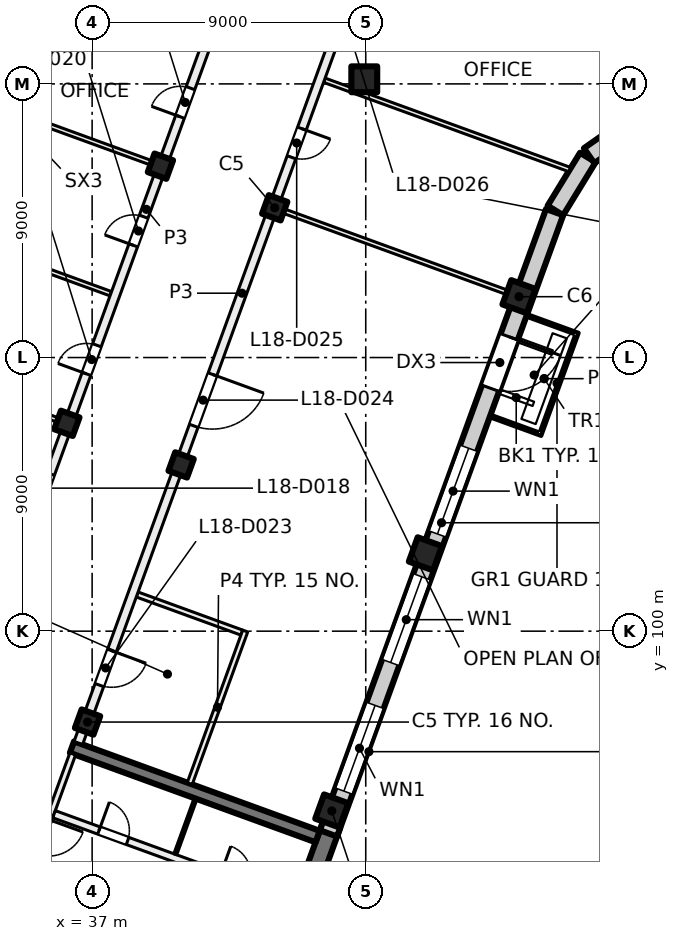
"""IFC4 building model, lengths in metres.
Left out: names, types, materials, properties, quantities, classifications, styles, units other than length and angle.
Written with IfcOpenShell. Run it as: python <this file> out.ifc"""

import sys

from ifc_helpers import new_model, si_unit, direction, frame, frame_2d, origin, origin_2d, place, context, subcontext, project, spatial, rectangle, extrude, element, fill, save


model = new_model("IFC4")
c1 = context("Model", 3, precision=1e-05, world=origin(), true_north=direction((0.0, 1.0)))
c2 = subcontext(c1, "Body", "Model", "MODEL_VIEW")
j1 = project(units=[si_unit("LENGTHUNIT", "METRE"), si_unit("PLANEANGLEUNIT", "RADIAN")], contexts=[c1])
p1 = place(None, origin())
s1 = spatial("IfcSite", under=j1, at=p1, CompositionType="ELEMENT")
p2 = place(p1, origin())
s2 = spatial("IfcBuilding", under=s1, at=p2, CompositionType="ELEMENT")
p3 = place(p2, frame((0.0, 0.0, 81.0)))
s3 = spatial("IfcBuildingStorey", under=s2, at=p3, CompositionType="ELEMENT", Elevation=81.0)
p4 = place(p3, frame((45.952, 118.152, 0.0), z_axis=(0.0, 0.0, 1.0), x_axis=(1.0, 0.0, 0.0)))
e1 = element("IfcColumn", 1, at=p4, inside=s3, PredefinedType="COLUMN", context=c2, shape_type="SweptSolid", body=[
    extrude(rectangle(XDim=0.85, YDim=0.85, at=origin_2d()), origin(), (0.0, 0.0, 1.0), 4.0),
])
for number, where, z_axis, x_axis in (
    (2, (43.006, 113.925, 0.0), (0.0, 0.0, 1.0), (-0.342, -0.94, 0.0)),
    (3, (39.927, 105.468, 0.0), (0.0, 0.0, 1.0), (-0.342, -0.94, 0.0)),
    (4, (36.849, 97.011, 0.0), (0.0, 0.0, 1.0), (-0.342, -0.94, 0.0)),
    (5, (39.247, 115.293, 0.0), (0.0, 0.0, 1.0), (-0.342, -0.94, 0.0)),
    (6, (36.169, 106.836, 0.0), (0.0, 0.0, 1.0), (-0.342, -0.94, 0.0)),
):
    element("IfcColumn", number, at=place(p3, frame(where, z_axis=z_axis, x_axis=x_axis)), inside=s3, PredefinedType="COLUMN", context=c2, shape_type="SweptSolid", body=[
        extrude(rectangle(XDim=0.65, YDim=0.65, at=origin_2d()), origin(), (0.0, 0.0, 1.0), 4.0),
    ])
for number, where, z_axis, x_axis in (
    (7, (51.04, 111.001, 0.0), (0.0, 0.0, 1.0), (-0.342, -0.94, 0.0)),
    (8, (47.962, 102.544, 0.0), (0.0, 0.0, 1.0), (-0.342, -0.94, 0.0)),
    (9, (44.884, 94.087, 0.0), (0.0, 0.0, 1.0), (-0.342, -0.94, 0.0)),
):
    element("IfcColumn", number, at=place(p3, frame(where, z_axis=z_axis, x_axis=x_axis)), inside=s3, PredefinedType="COLUMN", context=c2, shape_type="SweptSolid", body=[
        extrude(rectangle(XDim=0.85, YDim=0.85, at=origin_2d()), origin(), (0.0, 0.0, 1.0), 4.0),
    ])
p5 = place(p3, frame((41.827, 85.249, 0.0), z_axis=(0.0, 0.0, 1.0), x_axis=(0.342017595281, 0.939693548195, 0.0)))
e10 = element("IfcWall", 10, at=p5, inside=s3, PredefinedType="SHEAR", context=c2, shape_type="SweptSolid", body=[
    extrude(rectangle(XDim=8.925, YDim=0.6, at=frame_2d((4.462, 0.0))), origin(), (0.0, 0.0, 1.0), 4.0),
])
p6 = place(p3, frame((44.418, 93.245, 0.0), z_axis=(0.0, 0.0, 1.0), x_axis=(-0.93969060187, 0.342025690201, 0.0)))
e11 = element("IfcWall", 11, at=p6, inside=s3, PredefinedType="SHEAR", context=c2, shape_type="SweptSolid", body=[
    extrude(rectangle(XDim=8.6, YDim=0.4, at=frame_2d((4.3, 0.0))), origin(), (0.0, 0.0, 1.0), 4.0),
])
p7 = place(p3, frame((52.212, 113.783, 0.0), z_axis=(0.0, 0.0, 1.0), x_axis=(-0.34202521188, -0.939690775968, 0.0)))
e12 = element("IfcWall", 12, at=p7, inside=s3, PredefinedType="SOLIDWALL", context=c2, shape_type="SweptSolid", body=[
    extrude(rectangle(XDim=21.745, YDim=0.6, at=frame_2d((10.873, 0.0))), origin(), (0.0, 0.0, 1.0), 3.625),
])
p8 = place(p7, frame((4.365, 0.0, 0.0)))
e13 = element("IfcOpeningElement", 13, at=p8, cuts=e12, PredefinedType="OPENING", context=c2, shape_type="SweptSolid", body=[
    extrude(rectangle(XDim=1.8, YDim=2.4, at=frame_2d((0.9, 1.2))), frame((0.0, 0.31, 0.0), z_axis=(0.0, -1.0, 0.0), x_axis=(1.0, 0.0, 0.0)), (0.0, 0.0, 1.0), 0.62),
])
p9 = place(p7, frame((8.265, 0.0, 0.9)))
e14 = element("IfcOpeningElement", 14, at=p9, cuts=e12, PredefinedType="OPENING", context=c2, shape_type="SweptSolid", body=[
    extrude(rectangle(XDim=3.0, YDim=2.4, at=frame_2d((1.5, 1.2))), frame((0.0, 0.31, 0.0), z_axis=(0.0, -1.0, 0.0), x_axis=(1.0, 0.0, 0.0)), (0.0, 0.0, 1.0), 0.62),
])
p10 = place(p7, frame((12.765, 0.0, 0.9)))
e15 = element("IfcOpeningElement", 15, at=p10, cuts=e12, PredefinedType="OPENING", context=c2, shape_type="SweptSolid", body=[
    extrude(rectangle(XDim=3.0, YDim=2.4, at=frame_2d((1.5, 1.2))), frame((0.0, 0.31, 0.0), z_axis=(0.0, -1.0, 0.0), x_axis=(1.0, 0.0, 0.0)), (0.0, 0.0, 1.0), 0.62),
])
p11 = place(p7, frame((17.265, 0.0, 0.9)))
e16 = element("IfcOpeningElement", 16, at=p11, cuts=e12, PredefinedType="OPENING", context=c2, shape_type="SweptSolid", body=[
    extrude(rectangle(XDim=3.0, YDim=2.4, at=frame_2d((1.5, 1.2))), frame((0.0, 0.31, 0.0), z_axis=(0.0, -1.0, 0.0), x_axis=(1.0, 0.0, 0.0)), (0.0, 0.0, 1.0), 0.62),
])
p12 = place(p3, frame((53.305, 115.578, 0.0), z_axis=(0.0, 0.0, 1.0), x_axis=(-0.522402266438, -0.852699168535, 0.0)))
e17 = element("IfcWall", 17, at=p12, inside=s3, PredefinedType="SOLIDWALL", context=c2, shape_type="SweptSolid", body=[
    extrude(rectangle(XDim=2.042, YDim=0.6, at=frame_2d((1.021, 0.0))), origin(), (0.0, 0.0, 1.0), 3.625),
])
p13 = place(p3, frame((55.062, 116.839, 0.0), z_axis=(0.0, 0.0, 1.0), x_axis=(-0.819122269495, -0.573618956815, 0.0)))
e18 = element("IfcWall", 18, at=p13, inside=s3, PredefinedType="SOLIDWALL", context=c2, shape_type="SweptSolid", body=[
    extrude(rectangle(XDim=2.092, YDim=0.6, at=frame_2d((1.046, 0.0))), origin(), (0.0, 0.0, 1.0), 3.625),
])
p14 = place(p3, frame((24.666, 100.669, 0.0), z_axis=(0.0, 0.0, 1.0), x_axis=(0.34201964167, 0.939692803373, 0.0)))
e19 = element("IfcWall", 19, at=p14, inside=s3, PredefinedType="SOLIDWALL", context=c2, shape_type="SweptSolid", body=[
    extrude(rectangle(XDim=32.884, YDim=0.6, at=frame_2d((16.442, 0.0))), origin(), (0.0, 0.0, 1.0), 3.625),
])
p15 = place(p14, frame((1.48, 0.0, 0.9)))
e20 = element("IfcOpeningElement", 20, at=p15, cuts=e19, PredefinedType="OPENING", context=c2, shape_type="SweptSolid", body=[
    extrude(rectangle(XDim=3.0, YDim=2.4, at=frame_2d((1.5, 1.2))), frame((0.0, 0.31, 0.0), z_axis=(0.0, -1.0, 0.0), x_axis=(1.0, 0.0, 0.0)), (0.0, 0.0, 1.0), 0.62),
])
p16 = place(p14, frame((5.98, 0.0, 0.9)))
e21 = element("IfcOpeningElement", 21, at=p16, cuts=e19, PredefinedType="OPENING", context=c2, shape_type="SweptSolid", body=[
    extrude(rectangle(XDim=3.0, YDim=2.4, at=frame_2d((1.5, 1.2))), frame((0.0, 0.31, 0.0), z_axis=(0.0, -1.0, 0.0), x_axis=(1.0, 0.0, 0.0)), (0.0, 0.0, 1.0), 0.62),
])
p17 = place(p14, frame((10.48, 0.0, 0.9)))
e22 = element("IfcOpeningElement", 22, at=p17, cuts=e19, PredefinedType="OPENING", context=c2, shape_type="SweptSolid", body=[
    extrude(rectangle(XDim=3.0, YDim=2.4, at=frame_2d((1.5, 1.2))), frame((0.0, 0.31, 0.0), z_axis=(0.0, -1.0, 0.0), x_axis=(1.0, 0.0, 0.0)), (0.0, 0.0, 1.0), 0.62),
])
p18 = place(p14, frame((14.98, 0.0, 0.9)))
e23 = element("IfcOpeningElement", 23, at=p18, cuts=e19, PredefinedType="OPENING", context=c2, shape_type="SweptSolid", body=[
    extrude(rectangle(XDim=3.0, YDim=2.4, at=frame_2d((1.5, 1.2))), frame((0.0, 0.31, 0.0), z_axis=(0.0, -1.0, 0.0), x_axis=(1.0, 0.0, 0.0)), (0.0, 0.0, 1.0), 0.62),
])
p19 = place(p14, frame((20.08, 0.0, 0.0)))
e24 = element("IfcOpeningElement", 24, at=p19, cuts=e19, PredefinedType="OPENING", context=c2, shape_type="SweptSolid", body=[
    extrude(rectangle(XDim=1.8, YDim=2.4, at=frame_2d((0.9, 1.2))), frame((0.0, 0.31, 0.0), z_axis=(0.0, -1.0, 0.0), x_axis=(1.0, 0.0, 0.0)), (0.0, 0.0, 1.0), 0.62),
])
p20 = place(p14, frame((23.98, 0.0, 0.9)))
e25 = element("IfcOpeningElement", 25, at=p20, cuts=e19, PredefinedType="OPENING", context=c2, shape_type="SweptSolid", body=[
    extrude(rectangle(XDim=3.0, YDim=2.4, at=frame_2d((1.5, 1.2))), frame((0.0, 0.31, 0.0), z_axis=(0.0, -1.0, 0.0), x_axis=(1.0, 0.0, 0.0)), (0.0, 0.0, 1.0), 0.62),
])
p21 = place(p14, frame((28.48, 0.0, 0.9)))
e26 = element("IfcOpeningElement", 26, at=p21, cuts=e19, PredefinedType="OPENING", context=c2, shape_type="SweptSolid", body=[
    extrude(rectangle(XDim=3.0, YDim=2.4, at=frame_2d((1.5, 1.2))), frame((0.0, 0.31, 0.0), z_axis=(0.0, -1.0, 0.0), x_axis=(1.0, 0.0, 0.0)), (0.0, 0.0, 1.0), 0.62),
])
p22 = place(p3, frame((36.362, 95.964, 0.0), z_axis=(0.0, 0.0, 1.0), x_axis=(-0.341995824804, -0.939701471648, 0.0)))
e27 = element("IfcWall", 27, at=p22, inside=s3, PredefinedType="PARTITIONING", context=c2, shape_type="SweptSolid", body=[
    extrude(rectangle(XDim=3.8, YDim=0.2, at=frame_2d((1.9, 0.0))), origin(), (0.0, 0.0, 1.0), 3.625),
])
p23 = place(p22, frame((2.3, 0.0, 0.0)))
e28 = element("IfcOpeningElement", 28, at=p23, cuts=e27, PredefinedType="OPENING", context=c2, shape_type="SweptSolid", body=[
    extrude(rectangle(XDim=1.2, YDim=2.1, at=frame_2d((0.6, 1.05))), frame((0.0, 0.11, 0.0), z_axis=(0.0, -1.0, 0.0), x_axis=(1.0, 0.0, 0.0)), (0.0, 0.0, 1.0), 0.22),
])
p24 = place(p3, frame((35.19, 92.453, 0.0), z_axis=(0.0, 0.0, 1.0), x_axis=(0.939691552312, -0.342023078919, 0.0)))
e29 = element("IfcWall", 29, at=p24, inside=s3, PredefinedType="PARTITIONING", context=c2, shape_type="SweptSolid", body=[
    extrude(rectangle(XDim=8.4, YDim=0.2, at=frame_2d((4.2, 0.0))), origin(), (0.0, 0.0, 1.0), 3.625),
])
p25 = place(p24, frame((5.25, 0.0, 0.0)))
e30 = element("IfcOpeningElement", 30, at=p25, cuts=e29, PredefinedType="OPENING", context=c2, shape_type="SweptSolid", body=[
    extrude(rectangle(XDim=1.5, YDim=2.1, at=frame_2d((0.75, 1.05))), frame((0.0, 0.11, 0.0), z_axis=(0.0, -1.0, 0.0), x_axis=(1.0, 0.0, 0.0)), (0.0, 0.0, 1.0), 0.22),
])
p26 = place(p3, frame((35.746, 93.98, 0.0), z_axis=(0.0, 0.0, 1.0), x_axis=(0.939691552312, -0.342023078919, 0.0)))
e31 = element("IfcWall", 31, at=p26, inside=s3, PredefinedType="PARTITIONING", context=c2, shape_type="SweptSolid", body=[
    extrude(rectangle(XDim=8.4, YDim=0.25, at=frame_2d((4.2, 0.0))), origin(), (0.0, 0.0, 1.0), 3.625),
])
p27 = place(p26, frame((1.575, 0.0, 0.0)))
e32 = element("IfcOpeningElement", 32, at=p27, cuts=e31, PredefinedType="OPENING", context=c2, shape_type="SweptSolid", body=[
    extrude(rectangle(XDim=1.0, YDim=2.1, at=frame_2d((0.5, 1.05))), frame((0.0, 0.135, 0.0), z_axis=(0.0, -1.0, 0.0), x_axis=(1.0, 0.0, 0.0)), (0.0, 0.0, 1.0), 0.27),
])
p28 = place(p26, frame((5.825, 0.0, 0.0)))
e33 = element("IfcOpeningElement", 33, at=p28, cuts=e31, PredefinedType="OPENING", context=c2, shape_type="SweptSolid", body=[
    extrude(rectangle(XDim=1.0, YDim=2.1, at=frame_2d((0.5, 1.05))), frame((0.0, 0.135, 0.0), z_axis=(0.0, -1.0, 0.0), x_axis=(1.0, 0.0, 0.0)), (0.0, 0.0, 1.0), 0.27),
])
p29 = place(p3, frame((40.403, 94.494, 0.0), z_axis=(0.0, 0.0, 1.0), x_axis=(-0.342064742067, -0.939676386973, 0.0)))
e34 = element("IfcWall", 34, at=p29, inside=s3, PredefinedType="PARTITIONING", context=c2, shape_type="SweptSolid", body=[
    extrude(rectangle(XDim=1.95, YDim=0.1, at=frame_2d((0.975, 0.0))), origin(), (0.0, 0.0, 1.0), 3.625),
])
for number, where, z_axis, x_axis in (
    (35, (28.275, 109.709, 0.0), (0.0, 0.0, 1.0), (0.94, -0.342, 0.0)),
    (36, (29.814, 113.938, 0.0), (0.0, 0.0, 1.0), (0.94, -0.342, 0.0)),
):
    element("IfcWall", number, at=place(p3, frame(where, z_axis=z_axis, x_axis=x_axis)), inside=s3, PredefinedType="PARTITIONING", context=c2, shape_type="SweptSolid", body=[
        extrude(rectangle(XDim=8.301, YDim=0.15, at=frame_2d((4.15, 0.0))), origin(), (0.0, 0.0, 1.0), 3.625),
    ])
p30 = place(p3, frame((31.353, 118.166, 0.0), z_axis=(0.0, 0.0, 1.0), x_axis=(0.939687752599, -0.342033518263, 0.0)))
e37 = element("IfcWall", 37, at=p30, inside=s3, PredefinedType="PARTITIONING", context=c2, shape_type="SweptSolid", body=[
    extrude(rectangle(XDim=8.301, YDim=0.15, at=frame_2d((4.15, 0.0))), origin(), (0.0, 0.0, 1.0), 3.625),
])
p31 = place(p3, frame((32.881, 97.657, 0.0), z_axis=(0.0, 0.0, 1.0), x_axis=(0.342017360004, 0.939693633828, 0.0)))
e38 = element("IfcWall", 38, at=p31, inside=s3, PredefinedType="PARTITIONING", context=c2, shape_type="SweptSolid", body=[
    extrude(rectangle(XDim=34.516, YDim=0.3, at=frame_2d((17.258, 0.0))), origin(), (0.0, 0.0, 1.0), 3.625),
])
p32 = place(p31, frame((2.025, 0.0, 0.0)))
e39 = element("IfcOpeningElement", 39, at=p32, cuts=e38, PredefinedType="OPENING", context=c2, shape_type="SweptSolid", body=[
    extrude(rectangle(XDim=1.2, YDim=2.1, at=frame_2d((0.6, 1.05))), frame((0.0, 0.16, 0.0), z_axis=(0.0, -1.0, 0.0), x_axis=(1.0, 0.0, 0.0)), (0.0, 0.0, 1.0), 0.32),
])
p33 = place(p31, frame((7.0, 0.0, 0.0)))
e40 = element("IfcOpeningElement", 40, at=p33, cuts=e38, PredefinedType="OPENING", context=c2, shape_type="SweptSolid", body=[
    extrude(rectangle(XDim=1.0, YDim=2.1, at=frame_2d((0.5, 1.05))), frame((0.0, 0.16, 0.0), z_axis=(0.0, -1.0, 0.0), x_axis=(1.0, 0.0, 0.0)), (0.0, 0.0, 1.0), 0.32),
])
p34 = place(p31, frame((11.5, 0.0, 0.0)))
e41 = element("IfcOpeningElement", 41, at=p34, cuts=e38, PredefinedType="OPENING", context=c2, shape_type="SweptSolid", body=[
    extrude(rectangle(XDim=1.0, YDim=2.1, at=frame_2d((0.5, 1.05))), frame((0.0, 0.16, 0.0), z_axis=(0.0, -1.0, 0.0), x_axis=(1.0, 0.0, 0.0)), (0.0, 0.0, 1.0), 0.32),
])
p35 = place(p31, frame((16.0, 0.0, 0.0)))
e42 = element("IfcOpeningElement", 42, at=p35, cuts=e38, PredefinedType="OPENING", context=c2, shape_type="SweptSolid", body=[
    extrude(rectangle(XDim=1.0, YDim=2.1, at=frame_2d((0.5, 1.05))), frame((0.0, 0.16, 0.0), z_axis=(0.0, -1.0, 0.0), x_axis=(1.0, 0.0, 0.0)), (0.0, 0.0, 1.0), 0.32),
])
p36 = place(p31, frame((20.5, 0.0, 0.0)))
e43 = element("IfcOpeningElement", 43, at=p36, cuts=e38, PredefinedType="OPENING", context=c2, shape_type="SweptSolid", body=[
    extrude(rectangle(XDim=1.0, YDim=2.1, at=frame_2d((0.5, 1.05))), frame((0.0, 0.16, 0.0), z_axis=(0.0, -1.0, 0.0), x_axis=(1.0, 0.0, 0.0)), (0.0, 0.0, 1.0), 0.32),
])
p37 = place(p31, frame((25.0, 0.0, 0.0)))
e44 = element("IfcOpeningElement", 44, at=p37, cuts=e38, PredefinedType="OPENING", context=c2, shape_type="SweptSolid", body=[
    extrude(rectangle(XDim=1.0, YDim=2.1, at=frame_2d((0.5, 1.05))), frame((0.0, 0.16, 0.0), z_axis=(0.0, -1.0, 0.0), x_axis=(1.0, 0.0, 0.0)), (0.0, 0.0, 1.0), 0.32),
])
p38 = place(p31, frame((29.779, 0.0, 0.0)))
e45 = element("IfcOpeningElement", 45, at=p38, cuts=e38, PredefinedType="OPENING", context=c2, shape_type="SweptSolid", body=[
    extrude(rectangle(XDim=1.8, YDim=2.1, at=frame_2d((0.9, 1.05))), frame((0.0, 0.16, 0.0), z_axis=(0.0, -1.0, 0.0), x_axis=(1.0, 0.0, 0.0)), (0.0, 0.0, 1.0), 0.32),
])
p39 = place(p3, frame((38.482, 101.206, 0.0), z_axis=(0.0, 0.0, 1.0), x_axis=(0.939662978983, -0.342101572531, 0.0)))
e46 = element("IfcWall", 46, at=p39, inside=s3, PredefinedType="PARTITIONING", context=c2, shape_type="SweptSolid", body=[
    extrude(rectangle(XDim=3.663, YDim=0.175, at=frame_2d((1.832, 0.0))), origin(), (0.0, 0.0, 1.0), 3.625),
])
p40 = place(p3, frame((42.036, 100.005, 0.0), z_axis=(0.0, 0.0, 1.0), x_axis=(-0.341908323648, -0.939733312286, 0.0)))
e47 = element("IfcWall", 47, at=p40, inside=s3, PredefinedType="PARTITIONING", context=c2, shape_type="SweptSolid", body=[
    extrude(rectangle(XDim=5.338, YDim=0.175, at=frame_2d((2.669, 0.0))), origin(), (0.0, 0.0, 1.0), 3.625),
])
p41 = place(p3, frame((43.1, 113.891, 0.0), z_axis=(0.0, 0.0, 1.0), x_axis=(0.939670544866, -0.342080790328, 0.0)))
e48 = element("IfcWall", 48, at=p41, inside=s3, PredefinedType="PARTITIONING", context=c2, shape_type="SweptSolid", body=[
    extrude(rectangle(XDim=8.3, YDim=0.15, at=frame_2d((4.15, 0.0))), origin(), (0.0, 0.0, 1.0), 3.625),
])
p42 = place(p3, frame((44.639, 118.12, 0.0), z_axis=(0.0, 0.0, 1.0), x_axis=(0.939669707102, -0.342083091593, 0.0)))
e49 = element("IfcWall", 49, at=p42, inside=s3, PredefinedType="PARTITIONING", context=c2, shape_type="SweptSolid", body=[
    extrude(rectangle(XDim=8.589, YDim=0.15, at=frame_2d((4.295, 0.0))), origin(), (0.0, 0.0, 1.0), 3.625),
])
p43 = place(p3, frame((47.314, 125.909, 0.0), z_axis=(0.0, 0.0, 1.0), x_axis=(-0.342010770371, -0.939696032209, 0.0)))
e50 = element("IfcWall", 50, at=p43, inside=s3, PredefinedType="PARTITIONING", context=c2, shape_type="SweptSolid", body=[
    extrude(rectangle(XDim=31.485, YDim=0.3, at=frame_2d((15.742, 0.0))), origin(), (0.0, 0.0, 1.0), 3.625),
])
p44 = place(p43, frame((28.259, 0.0, 0.0)))
e51 = element("IfcOpeningElement", 51, at=p44, cuts=e50, PredefinedType="OPENING", context=c2, shape_type="SweptSolid", body=[
    extrude(rectangle(XDim=1.2, YDim=2.1, at=frame_2d((0.6, 1.05))), frame((0.0, 0.16, 0.0), z_axis=(0.0, -1.0, 0.0), x_axis=(1.0, 0.0, 0.0)), (0.0, 0.0, 1.0), 0.32),
])
p45 = place(p43, frame((18.584, 0.0, 0.0)))
e52 = element("IfcOpeningElement", 52, at=p45, cuts=e50, PredefinedType="OPENING", context=c2, shape_type="SweptSolid", body=[
    extrude(rectangle(XDim=1.8, YDim=2.1, at=frame_2d((0.9, 1.05))), frame((0.0, 0.16, 0.0), z_axis=(0.0, -1.0, 0.0), x_axis=(1.0, 0.0, 0.0)), (0.0, 0.0, 1.0), 0.32),
])
p46 = place(p43, frame((9.985, 0.0, 0.0)))
e53 = element("IfcOpeningElement", 53, at=p46, cuts=e50, PredefinedType="OPENING", context=c2, shape_type="SweptSolid", body=[
    extrude(rectangle(XDim=1.0, YDim=2.1, at=frame_2d((0.5, 1.05))), frame((0.0, 0.16, 0.0), z_axis=(0.0, -1.0, 0.0), x_axis=(1.0, 0.0, 0.0)), (0.0, 0.0, 1.0), 0.32),
])
p47 = place(p43, frame((5.484, 0.0, 0.0)))
e54 = element("IfcOpeningElement", 54, at=p47, cuts=e50, PredefinedType="OPENING", context=c2, shape_type="SweptSolid", body=[
    extrude(rectangle(XDim=1.0, YDim=2.1, at=frame_2d((0.5, 1.05))), frame((0.0, 0.16, 0.0), z_axis=(0.0, -1.0, 0.0), x_axis=(1.0, 0.0, 0.0)), (0.0, 0.0, 1.0), 0.32),
])
p48 = place(p8, origin())
e55 = element("IfcDoor", 55, at=p48, inside=s3, OperationType="DOUBLE_DOOR_SINGLE_SWING", PredefinedType="DOOR", context=c2, shape_type="SweptSolid", body=[
    extrude(rectangle(XDim=1.8, YDim=2.4, at=frame_2d((0.9, 1.2))), frame((0.0, 0.025, 0.0), z_axis=(0.0, -1.0, 0.0), x_axis=(1.0, 0.0, 0.0)), (0.0, 0.0, 1.0), 0.05),
])
fill(e13, e55)
p49 = place(p9, origin())
e56 = element("IfcWindow", 56, at=p49, inside=s3, PartitioningType="SINGLE_PANEL", PredefinedType="WINDOW", context=c2, shape_type="SweptSolid", body=[
    extrude(rectangle(XDim=3.0, YDim=2.4, at=frame_2d((1.5, 1.2))), frame((0.0, 0.03, 0.0), z_axis=(0.0, -1.0, 0.0), x_axis=(1.0, 0.0, 0.0)), (0.0, 0.0, 1.0), 0.06),
])
fill(e14, e56)
p50 = place(p10, origin())
e57 = element("IfcWindow", 57, at=p50, inside=s3, PartitioningType="SINGLE_PANEL", PredefinedType="WINDOW", context=c2, shape_type="SweptSolid", body=[
    extrude(rectangle(XDim=3.0, YDim=2.4, at=frame_2d((1.5, 1.2))), frame((0.0, 0.03, 0.0), z_axis=(0.0, -1.0, 0.0), x_axis=(1.0, 0.0, 0.0)), (0.0, 0.0, 1.0), 0.06),
])
fill(e15, e57)
p51 = place(p11, origin())
e58 = element("IfcWindow", 58, at=p51, inside=s3, PartitioningType="SINGLE_PANEL", PredefinedType="WINDOW", context=c2, shape_type="SweptSolid", body=[
    extrude(rectangle(XDim=3.0, YDim=2.4, at=frame_2d((1.5, 1.2))), frame((0.0, 0.03, 0.0), z_axis=(0.0, -1.0, 0.0), x_axis=(1.0, 0.0, 0.0)), (0.0, 0.0, 1.0), 0.06),
])
fill(e16, e58)
p52 = place(p27, origin())
e59 = element("IfcDoor", 59, at=p52, inside=s3, OperationType="SINGLE_SWING_RIGHT", PredefinedType="DOOR", context=c2, shape_type="SweptSolid", body=[
    extrude(rectangle(XDim=1.0, YDim=2.1, at=frame_2d((0.5, 1.05))), frame((0.0, 0.025, 0.0), z_axis=(0.0, -1.0, 0.0), x_axis=(1.0, 0.0, 0.0)), (0.0, 0.0, 1.0), 0.05),
])
fill(e32, e59)
p53 = place(p34, origin())
e60 = element("IfcDoor", 60, at=p53, inside=s3, OperationType="SINGLE_SWING_RIGHT", PredefinedType="DOOR", context=c2, shape_type="SweptSolid", body=[
    extrude(rectangle(XDim=1.0, YDim=2.1, at=frame_2d((0.5, 1.05))), frame((0.0, 0.025, 0.0), z_axis=(0.0, -1.0, 0.0), x_axis=(1.0, 0.0, 0.0)), (0.0, 0.0, 1.0), 0.05),
])
fill(e41, e60)
p54 = place(p35, origin())
e61 = element("IfcDoor", 61, at=p54, inside=s3, OperationType="SINGLE_SWING_LEFT", PredefinedType="DOOR", context=c2, shape_type="SweptSolid", body=[
    extrude(rectangle(XDim=1.0, YDim=2.1, at=frame_2d((0.5, 1.05))), frame((0.0, 0.025, 0.0), z_axis=(0.0, -1.0, 0.0), x_axis=(1.0, 0.0, 0.0)), (0.0, 0.0, 1.0), 0.05),
])
fill(e42, e61)
p55 = place(p36, origin())
e62 = element("IfcDoor", 62, at=p55, inside=s3, OperationType="SINGLE_SWING_LEFT", PredefinedType="DOOR", context=c2, shape_type="SweptSolid", body=[
    extrude(rectangle(XDim=1.0, YDim=2.1, at=frame_2d((0.5, 1.05))), frame((0.0, 0.025, 0.0), z_axis=(0.0, -1.0, 0.0), x_axis=(1.0, 0.0, 0.0)), (0.0, 0.0, 1.0), 0.05),
])
fill(e43, e62)
p56 = place(p44, origin())
e63 = element("IfcDoor", 63, at=p56, inside=s3, OperationType="DOUBLE_DOOR_SINGLE_SWING", PredefinedType="DOOR", context=c2, shape_type="SweptSolid", body=[
    extrude(rectangle(XDim=1.2, YDim=2.1, at=frame_2d((0.6, 1.05))), frame((0.0, 0.025, 0.0), z_axis=(0.0, -1.0, 0.0), x_axis=(1.0, 0.0, 0.0)), (0.0, 0.0, 1.0), 0.05),
])
fill(e51, e63)
p57 = place(p45, origin())
e64 = element("IfcDoor", 64, at=p57, inside=s3, OperationType="DOUBLE_DOOR_SINGLE_SWING", PredefinedType="DOOR", context=c2, shape_type="SweptSolid", body=[
    extrude(rectangle(XDim=1.8, YDim=2.1, at=frame_2d((0.9, 1.05))), frame((0.0, 0.025, 0.0), z_axis=(0.0, -1.0, 0.0), x_axis=(1.0, 0.0, 0.0)), (0.0, 0.0, 1.0), 0.05),
])
fill(e52, e64)
p58 = place(p46, origin())
e65 = element("IfcDoor", 65, at=p58, inside=s3, OperationType="SINGLE_SWING_LEFT", PredefinedType="DOOR", context=c2, shape_type="SweptSolid", body=[
    extrude(rectangle(XDim=1.0, YDim=2.1, at=frame_2d((0.5, 1.05))), frame((0.0, 0.025, 0.0), z_axis=(0.0, -1.0, 0.0), x_axis=(1.0, 0.0, 0.0)), (0.0, 0.0, 1.0), 0.05),
])
fill(e53, e65)
save(model, sys.argv[1])
